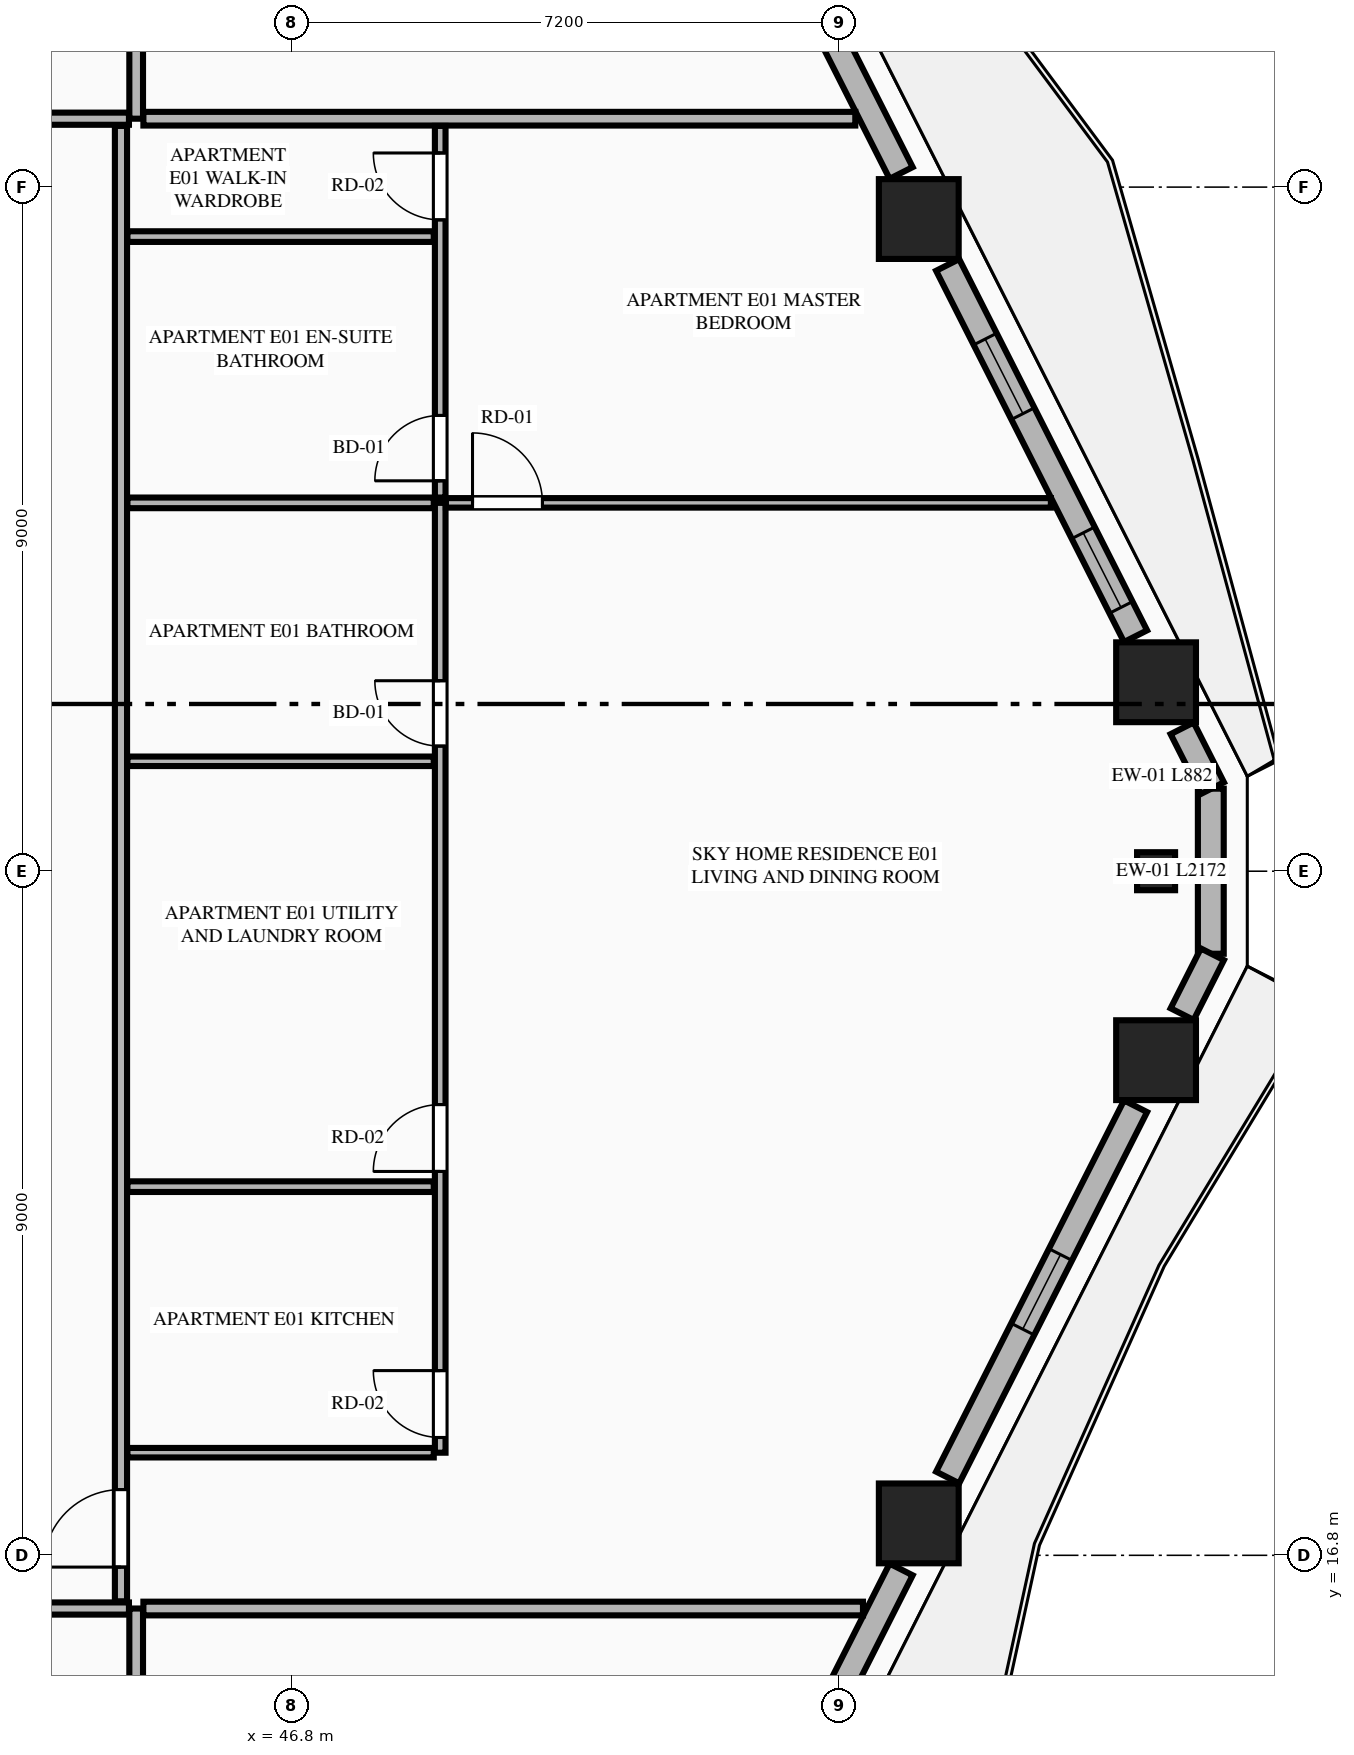
"""IFC4 building model, lengths in metres.
Left out: names, types, materials, properties, quantities, classifications, styles, units other than length and angle.
Written with IfcOpenShell. Run it as: python <this file> out.ifc"""

import sys

from ifc_helpers import new_model, si_unit, direction, frame, frame_2d, origin, origin_2d, place, context, subcontext, project, spatial, rectangle, extrude, element, fill, save


model = new_model("IFC4")
c1 = context("Model", 3, precision=1e-05, world=origin(), true_north=direction((0.0, 1.0)))
c2 = subcontext(c1, "Body", "Model", "MODEL_VIEW")
j1 = project(units=[si_unit("LENGTHUNIT", "METRE"), si_unit("PLANEANGLEUNIT", "RADIAN")], contexts=[c1])
p1 = place(None, origin())
s1 = spatial("IfcSite", under=j1, at=p1, CompositionType="ELEMENT")
p2 = place(p1, origin())
s2 = spatial("IfcBuilding", under=s1, at=p2, CompositionType="ELEMENT")
p3 = place(p2, frame((0.0, 0.0, 83.55)))
s3 = spatial("IfcBuildingStorey", under=s2, at=p3, CompositionType="ELEMENT", Elevation=83.55)
for number, where, z_axis, x_axis in (
    (1, (55.046, 17.22, 0.0), (0.0, 0.0, 1.0), (1.0, 0.0, 0.0)),
    (2, (58.168, 23.314, 0.0), (0.0, 0.0, 1.0), (1.0, 0.0, 0.0)),
    (3, (58.168, 28.286, 0.0), (0.0, 0.0, 1.0), (1.0, 0.0, 0.0)),
    (4, (55.046, 34.38, 0.0), (0.0, 0.0, 1.0), (1.0, 0.0, 0.0)),
):
    element("IfcColumn", number, at=place(p3, frame(where, z_axis=z_axis, x_axis=x_axis)), inside=s3, PredefinedType="COLUMN", context=c2, shape_type="SweptSolid", body=[
        extrude(rectangle(XDim=1.05, YDim=1.05, at=origin_2d()), origin(), (0.0, 0.0, 1.0), 3.55),
    ])
p4 = place(p3, frame((58.168, 25.8, 0.0), z_axis=(0.0, 0.0, 1.0), x_axis=(0.0, 1.0, 0.0)))
e5 = element("IfcColumn", 5, at=p4, inside=s3, PredefinedType="PILASTER", context=c2, shape_type="SweptSolid", body=[
    extrude(rectangle(XDim=0.5, YDim=0.35, at=origin_2d()), origin(), (0.0, 0.0, 1.0), 3.55),
])
p5 = place(p3, frame((58.888, 24.714, 0.0), z_axis=(0.0, 0.0, 1.0), x_axis=(0.0, 1.0, 0.0)))
e6 = element("IfcWall", 6, at=p5, inside=s3, PredefinedType="STANDARD", context=c2, shape_type="SweptSolid", body=[
    extrude(rectangle(XDim=2.172, YDim=0.34, at=frame_2d((1.086, 0.0))), origin(), (0.0, 0.0, 1.0), 3.33),
])
p6 = place(p3, frame((52.233, 11.515, 0.0), z_axis=(0.0, 0.0, 1.0), x_axis=(0.451616680182, 0.892212067942, 0.0)))
e7 = element("IfcWall", 7, at=p6, inside=s3, PredefinedType="STANDARD", context=c2, shape_type="SweptSolid", body=[
    extrude(rectangle(XDim=5.715, YDim=0.34, at=frame_2d((2.857, 0.0))), origin(), (0.0, 0.0, 1.0), 2.787),
])
p7 = place(p6, frame((1.894, 0.0, 0.0)))
e8 = element("IfcOpeningElement", 8, at=p7, cuts=e7, PredefinedType="OPENING", context=c2, shape_type="SweptSolid", body=[
    extrude(rectangle(XDim=1.1, YDim=2.25, at=frame_2d((0.55, 1.125))), frame((0.0, 0.18, 0.0), z_axis=(0.0, -1.0, 0.0), x_axis=(1.0, 0.0, 0.0)), (0.0, 0.0, 1.0), 0.36),
])
p8 = place(p3, frame((55.426, 17.824, 0.0), z_axis=(0.0, 0.0, 1.0), x_axis=(0.451579095309, 0.892231091523, 0.0)))
e9 = element("IfcWall", 9, at=p8, inside=s3, PredefinedType="STANDARD", context=c2, shape_type="SweptSolid", body=[
    extrude(rectangle(XDim=5.474, YDim=0.34, at=frame_2d((2.737, 0.0))), origin(), (0.0, 0.0, 1.0), 2.787),
])
p9 = place(p8, frame((2.187, 0.0, 0.75)))
e10 = element("IfcOpeningElement", 10, at=p9, cuts=e9, PredefinedType="OPENING", context=c2, shape_type="SweptSolid", body=[
    extrude(rectangle(XDim=1.1, YDim=1.887, at=frame_2d((0.55, 0.943))), frame((0.0, 0.18, 0.0), z_axis=(0.0, -1.0, 0.0), x_axis=(1.0, 0.0, 0.0)), (0.0, 0.0, 1.0), 0.36),
])
p10 = place(p3, frame((58.511, 23.92, 0.0), z_axis=(0.0, 0.0, 1.0), x_axis=(0.451195173259, 0.892425299747, 0.0)))
e11 = element("IfcWall", 11, at=p10, inside=s3, PredefinedType="STANDARD", context=c2, shape_type="SweptSolid", body=[
    extrude(rectangle(XDim=0.882, YDim=0.34, at=frame_2d((0.441, 0.0))), origin(), (0.0, 0.0, 1.0), 3.33),
])
p11 = place(p3, frame((58.909, 26.893, 0.0), z_axis=(0.0, 0.0, 1.0), x_axis=(-0.451306655769, 0.892368927327, 0.0)))
e12 = element("IfcWall", 12, at=p11, inside=s3, PredefinedType="STANDARD", context=c2, shape_type="SweptSolid", body=[
    extrude(rectangle(XDim=0.882, YDim=0.34, at=frame_2d((0.441, 0.0))), origin(), (0.0, 0.0, 1.0), 3.33),
])
p12 = place(p3, frame((57.898, 28.892, 0.0), z_axis=(0.0, 0.0, 1.0), x_axis=(-0.451597066012, 0.892221995901, 0.0)))
e13 = element("IfcWall", 13, at=p12, inside=s3, PredefinedType="STANDARD", context=c2, shape_type="SweptSolid", body=[
    extrude(rectangle(XDim=5.474, YDim=0.34, at=frame_2d((2.737, 0.0))), origin(), (0.0, 0.0, 1.0), 2.787),
])
p13 = place(p12, frame((0.424, 0.0, 0.75)))
e14 = element("IfcOpeningElement", 14, at=p13, cuts=e13, PredefinedType="OPENING", context=c2, shape_type="SweptSolid", body=[
    extrude(rectangle(XDim=1.1, YDim=1.887, at=frame_2d((0.55, 0.943))), frame((0.0, 0.18, 0.0), z_axis=(0.0, -1.0, 0.0), x_axis=(1.0, 0.0, 0.0)), (0.0, 0.0, 1.0), 0.36),
])
p14 = place(p12, frame((3.281, 0.0, 0.75)))
e15 = element("IfcOpeningElement", 15, at=p14, cuts=e13, PredefinedType="OPENING", context=c2, shape_type="SweptSolid", body=[
    extrude(rectangle(XDim=1.1, YDim=1.887, at=frame_2d((0.55, 0.943))), frame((0.0, 0.18, 0.0), z_axis=(0.0, -1.0, 0.0), x_axis=(1.0, 0.0, 0.0)), (0.0, 0.0, 1.0), 0.36),
])
p15 = place(p3, frame((54.814, 34.986, 0.0), z_axis=(0.0, 0.0, 1.0), x_axis=(-0.451633893529, 0.892203354744, 0.0)))
e16 = element("IfcWall", 16, at=p15, inside=s3, PredefinedType="STANDARD", context=c2, shape_type="SweptSolid", body=[
    extrude(rectangle(XDim=5.715, YDim=0.34, at=frame_2d((2.857, 0.0))), origin(), (0.0, 0.0, 1.0), 2.787),
])
p16 = place(p15, frame((2.833, 0.0, 0.0)))
e17 = element("IfcOpeningElement", 17, at=p16, cuts=e16, PredefinedType="OPENING", context=c2, shape_type="SweptSolid", body=[
    extrude(rectangle(XDim=1.1, YDim=2.25, at=frame_2d((0.55, 1.125))), frame((0.0, 0.18, 0.0), z_axis=(0.0, -1.0, 0.0), x_axis=(1.0, 0.0, 0.0)), (0.0, 0.0, 1.0), 0.36),
])
p17 = place(p3, frame((44.75, 2.455, 0.0), z_axis=(0.0, 0.0, 1.0), x_axis=(0.0, 1.0, 0.0)))
e18 = element("IfcWall", 18, at=p17, inside=s3, PredefinedType="PARTITIONING", context=c2, shape_type="SweptSolid", body=[
    extrude(rectangle(XDim=13.645, YDim=0.18, at=frame_2d((6.823, 0.0))), origin(), (0.0, 0.0, 1.0), 3.33),
])
p18 = place(p3, frame((20.145, 16.1, 0.0), z_axis=(0.0, 0.0, 1.0), x_axis=(1.0, 0.0, 0.0)))
e19 = element("IfcWall", 19, at=p18, inside=s3, PredefinedType="PARTITIONING", context=c2, shape_type="SweptSolid", body=[
    extrude(rectangle(XDim=24.51, YDim=0.16, at=frame_2d((12.255, 0.0))), origin(), (0.0, 0.0, 1.0), 3.33),
])
p19 = place(p18, frame((22.305, 0.0, 0.0)))
e20 = element("IfcOpeningElement", 20, at=p19, cuts=e19, PredefinedType="OPENING", context=c2, shape_type="SweptSolid", body=[
    extrude(rectangle(XDim=1.02, YDim=2.25, at=frame_2d((0.51, 1.125))), frame((0.0, 0.09, 0.0), z_axis=(0.0, -1.0, 0.0), x_axis=(1.0, 0.0, 0.0)), (0.0, 0.0, 1.0), 0.18),
])
p20 = place(p3, frame((44.75, 35.7, 0.0), z_axis=(0.0, 0.0, 1.0), x_axis=(0.0, 1.0, 0.0)))
e21 = element("IfcWall", 21, at=p20, inside=s3, PredefinedType="PARTITIONING", context=c2, shape_type="SweptSolid", body=[
    extrude(rectangle(XDim=13.445, YDim=0.18, at=frame_2d((6.723, 0.0))), origin(), (0.0, 0.0, 1.0), 3.33),
])
p21 = place(p3, frame((20.145, 35.7, 0.0), z_axis=(0.0, 0.0, 1.0), x_axis=(1.0, 0.0, 0.0)))
e22 = element("IfcWall", 22, at=p21, inside=s3, PredefinedType="PARTITIONING", context=c2, shape_type="SweptSolid", body=[
    extrude(rectangle(XDim=24.51, YDim=0.16, at=frame_2d((12.255, 0.0))), origin(), (0.0, 0.0, 1.0), 3.33),
])
p22 = place(p21, frame((22.305, 0.0, 0.0)))
e23 = element("IfcOpeningElement", 23, at=p22, cuts=e22, PredefinedType="OPENING", context=c2, shape_type="SweptSolid", body=[
    extrude(rectangle(XDim=1.02, YDim=2.25, at=frame_2d((0.51, 1.125))), frame((0.0, 0.09, 0.0), z_axis=(0.0, -1.0, 0.0), x_axis=(1.0, 0.0, 0.0)), (0.0, 0.0, 1.0), 0.18),
])
p23 = place(p3, frame((44.845, 16.1, 0.0), z_axis=(0.0, 0.0, 1.0), x_axis=(1.0, 0.0, 0.0)))
e24 = element("IfcWall", 24, at=p23, inside=s3, PredefinedType="PARTITIONING", context=c2, shape_type="SweptSolid", body=[
    extrude(rectangle(XDim=9.467, YDim=0.18, at=frame_2d((4.733, 0.0))), origin(), (0.0, 0.0, 1.0), 3.33),
])
p24 = place(p3, frame((44.845, 35.7, 0.0), z_axis=(0.0, 0.0, 1.0), x_axis=(1.0, 0.0, 0.0)))
e25 = element("IfcWall", 25, at=p24, inside=s3, PredefinedType="PARTITIONING", context=c2, shape_type="SweptSolid", body=[
    extrude(rectangle(XDim=9.366, YDim=0.18, at=frame_2d((4.683, 0.0))), origin(), (0.0, 0.0, 1.0), 3.33),
])
p25 = place(p3, frame((44.55, 16.195, 0.0), z_axis=(0.0, 0.0, 1.0), x_axis=(0.0, 1.0, 0.0)))
e26 = element("IfcWall", 26, at=p25, inside=s3, PredefinedType="PARTITIONING", context=c2, shape_type="SweptSolid", body=[
    extrude(rectangle(XDim=19.41, YDim=0.16, at=frame_2d((9.705, 0.0))), origin(), (0.0, 0.0, 1.0), 2.636),
])
p26 = place(p25, frame((0.45, 0.0, 0.0)))
e27 = element("IfcOpeningElement", 27, at=p26, cuts=e26, PredefinedType="OPENING", context=c2, shape_type="SweptSolid", body=[
    extrude(rectangle(XDim=1.02, YDim=2.25, at=frame_2d((0.51, 1.125))), frame((0.0, 0.09, 0.0), z_axis=(0.0, -1.0, 0.0), x_axis=(1.0, 0.0, 0.0)), (0.0, 0.0, 1.0), 0.18),
])
p27 = place(p3, frame((44.635, 18.15, 0.0), z_axis=(0.0, 0.0, 1.0), x_axis=(1.0, 0.0, 0.0)))
e28 = element("IfcWall", 28, at=p27, inside=s3, PredefinedType="PARTITIONING", context=c2, shape_type="SweptSolid", body=[
    extrude(rectangle(XDim=4.03, YDim=0.125, at=frame_2d((2.015, 0.0))), origin(), (0.0, 0.0, 1.0), 2.636),
])
p28 = place(p3, frame((48.75, 18.15, 0.0), z_axis=(0.0, 0.0, 1.0), x_axis=(0.0, 1.0, 0.0)))
e29 = element("IfcWall", 29, at=p28, inside=s3, PredefinedType="PLUMBINGWALL", context=c2, shape_type="SweptSolid", body=[
    extrude(rectangle(XDim=12.496, YDim=0.14, at=frame_2d((6.248, 0.0))), origin(), (0.0, 0.0, 1.0), 3.33),
])
p29 = place(p28, frame((0.2, 0.0, 0.0)))
e30 = element("IfcOpeningElement", 30, at=p29, cuts=e29, PredefinedType="OPENING", context=c2, shape_type="SweptSolid", body=[
    extrude(rectangle(XDim=0.88, YDim=2.15, at=frame_2d((0.44, 1.075))), frame((0.0, 0.08, 0.0), z_axis=(0.0, -1.0, 0.0), x_axis=(1.0, 0.0, 0.0)), (0.0, 0.0, 1.0), 0.16),
])
p30 = place(p28, frame((3.7, 0.0, 0.0)))
e31 = element("IfcOpeningElement", 31, at=p30, cuts=e29, PredefinedType="OPENING", context=c2, shape_type="SweptSolid", body=[
    extrude(rectangle(XDim=0.88, YDim=2.15, at=frame_2d((0.44, 1.075))), frame((0.0, 0.08, 0.0), z_axis=(0.0, -1.0, 0.0), x_axis=(1.0, 0.0, 0.0)), (0.0, 0.0, 1.0), 0.16),
])
p31 = place(p28, frame((9.296, 0.0, 0.0)))
e32 = element("IfcOpeningElement", 32, at=p31, cuts=e29, PredefinedType="OPENING", context=c2, shape_type="SweptSolid", body=[
    extrude(rectangle(XDim=0.86, YDim=2.1, at=frame_2d((0.43, 1.05))), frame((0.0, 0.08, 0.0), z_axis=(0.0, -1.0, 0.0), x_axis=(1.0, 0.0, 0.0)), (0.0, 0.0, 1.0), 0.16),
])
p32 = place(p3, frame((48.75, 30.716, 0.0), z_axis=(0.0, 0.0, 1.0), x_axis=(0.0, 1.0, 0.0)))
e33 = element("IfcWall", 33, at=p32, inside=s3, PredefinedType="PLUMBINGWALL", context=c2, shape_type="SweptSolid", body=[
    extrude(rectangle(XDim=4.889, YDim=0.14, at=frame_2d((2.444, 0.0))), origin(), (0.0, 0.0, 1.0), 3.33),
])
p33 = place(p32, frame((0.22, 0.0, 0.0)))
e34 = element("IfcOpeningElement", 34, at=p33, cuts=e33, PredefinedType="OPENING", context=c2, shape_type="SweptSolid", body=[
    extrude(rectangle(XDim=0.86, YDim=2.1, at=frame_2d((0.43, 1.05))), frame((0.0, 0.08, 0.0), z_axis=(0.0, -1.0, 0.0), x_axis=(1.0, 0.0, 0.0)), (0.0, 0.0, 1.0), 0.16),
])
p34 = place(p32, frame((3.653, 0.0, 0.0)))
e35 = element("IfcOpeningElement", 35, at=p34, cuts=e33, PredefinedType="OPENING", context=c2, shape_type="SweptSolid", body=[
    extrude(rectangle(XDim=0.88, YDim=2.15, at=frame_2d((0.44, 1.075))), frame((0.0, 0.08, 0.0), z_axis=(0.0, -1.0, 0.0), x_axis=(1.0, 0.0, 0.0)), (0.0, 0.0, 1.0), 0.16),
])
p35 = place(p3, frame((44.635, 30.646, 0.0), z_axis=(0.0, 0.0, 1.0), x_axis=(1.0, 0.0, 0.0)))
e36 = element("IfcWall", 36, at=p35, inside=s3, PredefinedType="PLUMBINGWALL", context=c2, shape_type="SweptSolid", body=[
    extrude(rectangle(XDim=4.03, YDim=0.14, at=frame_2d((2.015, 0.0))), origin(), (0.0, 0.0, 1.0), 3.33),
])
p36 = place(p3, frame((48.825, 30.646, 0.0), z_axis=(0.0, 0.0, 1.0), x_axis=(1.0, 0.0, 0.0)))
e37 = element("IfcWall", 37, at=p36, inside=s3, PredefinedType="PARTITIONING", context=c2, shape_type="SweptSolid", body=[
    extrude(rectangle(XDim=7.959, YDim=0.125, at=frame_2d((3.979, 0.0))), origin(), (0.0, 0.0, 1.0), 3.33),
])
p37 = place(p36, frame((0.35, 0.0, 0.0)))
e38 = element("IfcOpeningElement", 38, at=p37, cuts=e37, PredefinedType="OPENING", context=c2, shape_type="SweptSolid", body=[
    extrude(rectangle(XDim=0.92, YDim=2.15, at=frame_2d((0.46, 1.075))), frame((0.0, 0.073, 0.0), z_axis=(0.0, -1.0, 0.0), x_axis=(1.0, 0.0, 0.0)), (0.0, 0.0, 1.0), 0.145),
])
p38 = place(p3, frame((44.635, 21.65, 0.0), z_axis=(0.0, 0.0, 1.0), x_axis=(1.0, 0.0, 0.0)))
e39 = element("IfcWall", 39, at=p38, inside=s3, PredefinedType="PLUMBINGWALL", context=c2, shape_type="SweptSolid", body=[
    extrude(rectangle(XDim=4.03, YDim=0.14, at=frame_2d((2.015, 0.0))), origin(), (0.0, 0.0, 1.0), 3.33),
])
p39 = place(p3, frame((44.635, 27.246, 0.0), z_axis=(0.0, 0.0, 1.0), x_axis=(1.0, 0.0, 0.0)))
e40 = element("IfcWall", 40, at=p39, inside=s3, PredefinedType="PARTITIONING", context=c2, shape_type="SweptSolid", body=[
    extrude(rectangle(XDim=4.03, YDim=0.125, at=frame_2d((2.015, 0.0))), origin(), (0.0, 0.0, 1.0), 3.33),
])
p40 = place(p3, frame((44.635, 34.149, 0.0), z_axis=(0.0, 0.0, 1.0), x_axis=(1.0, 0.0, 0.0)))
e41 = element("IfcWall", 41, at=p40, inside=s3, PredefinedType="PLUMBINGWALL", context=c2, shape_type="SweptSolid", body=[
    extrude(rectangle(XDim=4.03, YDim=0.14, at=frame_2d((2.015, 0.0))), origin(), (0.0, 0.0, 1.0), 2.636),
])
p41 = place(p9, origin())
e42 = element("IfcWindow", 42, at=p41, inside=s3, PartitioningType="SINGLE_PANEL", PredefinedType="WINDOW", context=c2, shape_type="SweptSolid", body=[
    extrude(rectangle(XDim=1.1, YDim=1.887, at=frame_2d((0.55, 0.943))), frame((0.0, 0.03, 0.0), z_axis=(0.0, -1.0, 0.0), x_axis=(1.0, 0.0, 0.0)), (0.0, 0.0, 1.0), 0.06),
])
fill(e10, e42)
p42 = place(p13, origin())
e43 = element("IfcWindow", 43, at=p42, inside=s3, PartitioningType="SINGLE_PANEL", PredefinedType="WINDOW", context=c2, shape_type="SweptSolid", body=[
    extrude(rectangle(XDim=1.1, YDim=1.887, at=frame_2d((0.55, 0.943))), frame((0.0, 0.03, 0.0), z_axis=(0.0, -1.0, 0.0), x_axis=(1.0, 0.0, 0.0)), (0.0, 0.0, 1.0), 0.06),
])
fill(e14, e43)
p43 = place(p29, origin())
e44 = element("IfcDoor", 44, at=p43, inside=s3, OperationType="SINGLE_SWING_RIGHT", PredefinedType="DOOR", context=c2, shape_type="SweptSolid", body=[
    extrude(rectangle(XDim=0.88, YDim=2.15, at=frame_2d((0.44, 1.075))), frame((0.0, 0.025, 0.0), z_axis=(0.0, -1.0, 0.0), x_axis=(1.0, 0.0, 0.0)), (0.0, 0.0, 1.0), 0.05),
])
fill(e30, e44)
p44 = place(p30, origin())
e45 = element("IfcDoor", 45, at=p44, inside=s3, OperationType="SINGLE_SWING_LEFT", PredefinedType="DOOR", context=c2, shape_type="SweptSolid", body=[
    extrude(rectangle(XDim=0.88, YDim=2.15, at=frame_2d((0.44, 1.075))), frame((0.0, 0.025, 0.0), z_axis=(0.0, -1.0, 0.0), x_axis=(1.0, 0.0, 0.0)), (0.0, 0.0, 1.0), 0.05),
])
fill(e31, e45)
p45 = place(p31, origin())
e46 = element("IfcDoor", 46, at=p45, inside=s3, OperationType="SINGLE_SWING_RIGHT", PredefinedType="DOOR", context=c2, shape_type="SweptSolid", body=[
    extrude(rectangle(XDim=0.86, YDim=2.1, at=frame_2d((0.43, 1.05))), frame((0.0, 0.025, 0.0), z_axis=(0.0, -1.0, 0.0), x_axis=(1.0, 0.0, 0.0)), (0.0, 0.0, 1.0), 0.05),
])
fill(e32, e46)
p46 = place(p33, origin())
e47 = element("IfcDoor", 47, at=p46, inside=s3, OperationType="SINGLE_SWING_LEFT", PredefinedType="DOOR", context=c2, shape_type="SweptSolid", body=[
    extrude(rectangle(XDim=0.86, YDim=2.1, at=frame_2d((0.43, 1.05))), frame((0.0, 0.025, 0.0), z_axis=(0.0, -1.0, 0.0), x_axis=(1.0, 0.0, 0.0)), (0.0, 0.0, 1.0), 0.05),
])
fill(e34, e47)
p47 = place(p34, origin())
e48 = element("IfcDoor", 48, at=p47, inside=s3, OperationType="SINGLE_SWING_RIGHT", PredefinedType="DOOR", context=c2, shape_type="SweptSolid", body=[
    extrude(rectangle(XDim=0.88, YDim=2.15, at=frame_2d((0.44, 1.075))), frame((0.0, 0.025, 0.0), z_axis=(0.0, -1.0, 0.0), x_axis=(1.0, 0.0, 0.0)), (0.0, 0.0, 1.0), 0.05),
])
fill(e35, e48)
p48 = place(p26, origin())
e49 = element("IfcDoor", 49, at=p48, inside=s3, OperationType="SINGLE_SWING_LEFT", PredefinedType="DOOR", context=c2, shape_type="SweptSolid", body=[
    extrude(rectangle(XDim=1.02, YDim=2.25, at=frame_2d((0.51, 1.125))), frame((0.0, 0.025, 0.0), z_axis=(0.0, -1.0, 0.0), x_axis=(1.0, 0.0, 0.0)), (0.0, 0.0, 1.0), 0.05),
])
fill(e27, e49)
p49 = place(p37, origin())
e50 = element("IfcDoor", 50, at=p49, inside=s3, OperationType="SINGLE_SWING_LEFT", PredefinedType="DOOR", context=c2, shape_type="SweptSolid", body=[
    extrude(rectangle(XDim=0.92, YDim=2.15, at=frame_2d((0.46, 1.075))), frame((0.0, 0.025, 0.0), z_axis=(0.0, -1.0, 0.0), x_axis=(1.0, 0.0, 0.0)), (0.0, 0.0, 1.0), 0.05),
])
fill(e38, e50)
p50 = place(p14, origin())
e51 = element("IfcWindow", 51, at=p50, inside=s3, PartitioningType="SINGLE_PANEL", PredefinedType="WINDOW", context=c2, shape_type="SweptSolid", body=[
    extrude(rectangle(XDim=1.1, YDim=1.887, at=frame_2d((0.55, 0.943))), frame((0.0, 0.03, 0.0), z_axis=(0.0, -1.0, 0.0), x_axis=(1.0, 0.0, 0.0)), (0.0, 0.0, 1.0), 0.06),
])
fill(e15, e51)
save(model, sys.argv[1])
